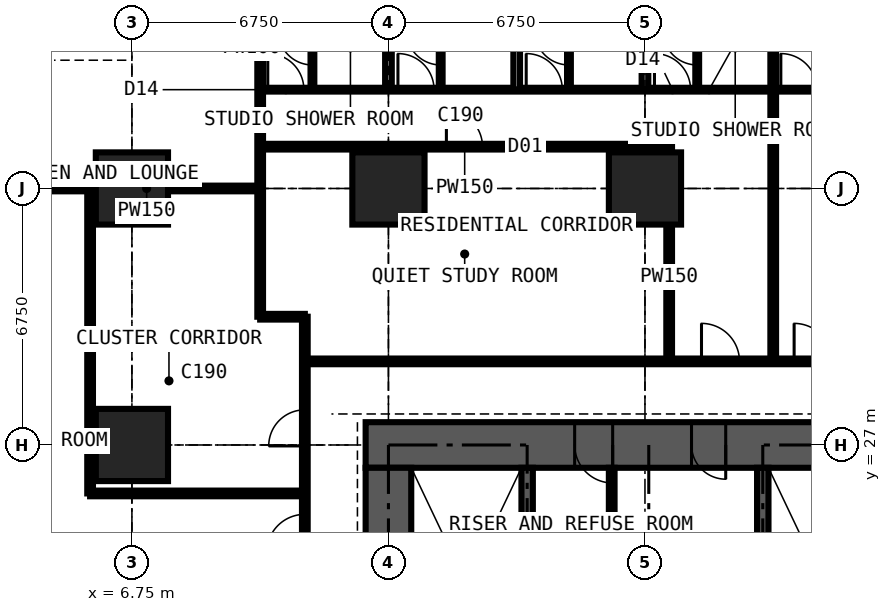
"""IFC4 building model, lengths in metres.
Left out: names, types, materials, properties, quantities, classifications, styles, units other than length and angle.
Written with IfcOpenShell. Run it as: python <this file> out.ifc"""

import sys

from ifc_helpers import new_model, si_unit, direction, frame, frame_2d, origin, origin_2d, place, context, subcontext, project, spatial, rectangle, extrude, element, fill, save


model = new_model("IFC4")
c1 = context("Model", 3, precision=1e-05, world=origin(), true_north=direction((0.0, 1.0)))
c2 = subcontext(c1, "Body", "Model", "MODEL_VIEW")
j1 = project(units=[si_unit("LENGTHUNIT", "METRE"), si_unit("PLANEANGLEUNIT", "RADIAN")], contexts=[c1])
p1 = place(None, origin())
s1 = spatial("IfcSite", under=j1, at=p1, CompositionType="ELEMENT")
p2 = place(p1, origin())
s2 = spatial("IfcBuilding", under=s1, at=p2, CompositionType="ELEMENT")
p3 = place(p2, frame((0.0, 0.0, 32.4)))
s3 = spatial("IfcBuildingStorey", under=s2, at=p3, CompositionType="ELEMENT", Elevation=32.4)
for number, where, z_axis, x_axis in (
    (1, (6.75, 27.0, 0.0), (0.0, 0.0, 1.0), (1.0, 0.0, 0.0)),
    (2, (6.75, 33.75, 0.0), (0.0, 0.0, 1.0), (1.0, 0.0, 0.0)),
    (3, (13.5, 33.75, 0.0), (0.0, 0.0, 1.0), (1.0, 0.0, 0.0)),
    (4, (20.25, 33.75, 0.0), (0.0, 0.0, 1.0), (1.0, 0.0, 0.0)),
):
    element("IfcColumn", number, at=place(p3, frame(where, z_axis=z_axis, x_axis=x_axis)), inside=s3, PredefinedType="COLUMN", context=c2, shape_type="SweptSolid", body=[
        extrude(rectangle(XDim=1.9, YDim=1.9, at=origin_2d()), origin(), (0.0, 0.0, 1.0), 3.6),
    ])
p4 = place(p3, frame((27.6, 27.0, 0.0), z_axis=(0.0, 0.0, 1.0), x_axis=(-1.0, 0.0, 0.0)))
e5 = element("IfcWall", 5, at=p4, inside=s3, PredefinedType="SHEAR", context=c2, shape_type="SweptSolid", body=[
    extrude(rectangle(XDim=14.7, YDim=1.2, at=frame_2d((7.35, 0.0))), origin(), (0.0, 0.0, 1.0), 3.6),
])
p5 = place(p4, frame((5.225, 0.0, 0.0)))
e6 = element("IfcOpeningElement", 6, at=p5, cuts=e5, PredefinedType="OPENING", context=c2, shape_type="SweptSolid", body=[
    extrude(rectangle(XDim=0.9, YDim=2.2, at=frame_2d((0.45, 1.1))), frame((0.0, 0.61, 0.0), z_axis=(0.0, -1.0, 0.0), x_axis=(1.0, 0.0, 0.0)), (0.0, 0.0, 1.0), 1.22),
])
p6 = place(p4, frame((8.2, 0.0, 0.0)))
e7 = element("IfcOpeningElement", 7, at=p6, cuts=e5, PredefinedType="OPENING", context=c2, shape_type="SweptSolid", body=[
    extrude(rectangle(XDim=1.0, YDim=2.2, at=frame_2d((0.5, 1.1))), frame((0.0, 0.61, 0.0), z_axis=(0.0, -1.0, 0.0), x_axis=(1.0, 0.0, 0.0)), (0.0, 0.0, 1.0), 1.22),
])
p7 = place(p3, frame((13.5, 26.4, 0.0), z_axis=(0.0, 0.0, 1.0), x_axis=(0.0, -1.0, 0.0)))
e8 = element("IfcWall", 8, at=p7, inside=s3, PredefinedType="SHEAR", context=c2, shape_type="SweptSolid", body=[
    extrude(rectangle(XDim=12.3, YDim=1.2, at=frame_2d((6.15, 0.0))), origin(), (0.0, 0.0, 1.0), 3.6),
])
p8 = place(p7, frame((7.45, 0.0, 0.0)))
e9 = element("IfcOpeningElement", 9, at=p8, cuts=e8, PredefinedType="OPENING", context=c2, shape_type="SweptSolid", body=[
    extrude(rectangle(XDim=1.2, YDim=2.2, at=frame_2d((0.6, 1.1))), frame((0.0, 0.61, 0.0), z_axis=(0.0, -1.0, 0.0), x_axis=(1.0, 0.0, 0.0)), (0.0, 0.0, 1.0), 1.22),
])
for number, where, z_axis, x_axis in (
    (10, (17.15, 20.3, 0.0), (0.0, 0.0, 1.0), (0.0, 1.0, 0.0)),
    (11, (23.35, 20.3, 0.0), (0.0, 0.0, 1.0), (0.0, 1.0, 0.0)),
):
    element("IfcWall", number, at=place(p3, frame(where, z_axis=z_axis, x_axis=x_axis)), inside=s3, PredefinedType="SHEAR", context=c2, shape_type="SweptSolid", body=[
        extrude(rectangle(XDim=6.1, YDim=0.3, at=frame_2d((3.05, 0.0))), origin(), (0.0, 0.0, 1.0), 3.6),
    ])
p9 = place(p3, frame((19.375, 23.4, 0.0), z_axis=(0.0, 0.0, 1.0), x_axis=(0.0, 1.0, 0.0)))
e12 = element("IfcWall", 12, at=p9, inside=s3, PredefinedType="PARTITIONING", context=c2, shape_type="SweptSolid", body=[
    extrude(rectangle(XDim=3.0, YDim=0.15, at=frame_2d((1.5, 0.0))), origin(), (0.0, 0.0, 1.0), 3.375),
])
p10 = place(p3, frame((4.15, 33.75, 0.0), z_axis=(0.0, 0.0, 1.0), x_axis=(1.0, 0.0, 0.0)))
e13 = element("IfcWall", 13, at=p10, inside=s3, PredefinedType="PARTITIONING", context=c2, shape_type="SweptSolid", body=[
    extrude(rectangle(XDim=5.975, YDim=0.15, at=frame_2d((2.988, 0.0))), origin(), (0.0, 0.0, 1.0), 2.877),
])
p11 = place(p3, frame((5.65, 25.725, 0.0), z_axis=(0.0, 0.0, 1.0), x_axis=(0.0, 1.0, 0.0)))
e14 = element("IfcWall", 14, at=p11, inside=s3, PredefinedType="PARTITIONING", context=c2, shape_type="SweptSolid", body=[
    extrude(rectangle(XDim=8.025, YDim=0.15, at=frame_2d((4.012, 0.0))), origin(), (0.0, 0.0, 1.0), 3.375),
])
p12 = place(p3, frame((5.65, 25.725, 0.0), z_axis=(0.0, 0.0, 1.0), x_axis=(1.0, 0.0, 0.0)))
e15 = element("IfcWall", 15, at=p12, inside=s3, PredefinedType="PARTITIONING", context=c2, shape_type="SweptSolid", body=[
    extrude(rectangle(XDim=5.65, YDim=0.15, at=frame_2d((2.825, 0.0))), origin(), (0.0, 0.0, 1.0), 3.375),
])
p13 = place(p3, frame((10.125, 30.375, 0.0), z_axis=(0.0, 0.0, 1.0), x_axis=(0.0, 1.0, 0.0)))
e16 = element("IfcWall", 16, at=p13, inside=s3, PredefinedType="PARTITIONING", context=c2, shape_type="SweptSolid", body=[
    extrude(rectangle(XDim=10.859, YDim=0.15, at=frame_2d((5.429, 0.0))), origin(), (0.0, 0.0, 1.0), 3.375),
])
p14 = place(p3, frame((10.125, 30.375, 0.0), z_axis=(0.0, 0.0, 1.0), x_axis=(1.0, 0.0, 0.0)))
e17 = element("IfcWall", 17, at=p14, inside=s3, PredefinedType="PARTITIONING", context=c2, shape_type="SweptSolid", body=[
    extrude(rectangle(XDim=1.175, YDim=0.15, at=frame_2d((0.587, 0.0))), origin(), (0.0, 0.0, 1.0), 3.375),
])
p15 = place(p3, frame((10.125, 34.85, 0.0), z_axis=(0.0, 0.0, 1.0), x_axis=(1.0, 0.0, 0.0)))
e18 = element("IfcWall", 18, at=p15, inside=s3, PredefinedType="PARTITIONING", context=c2, shape_type="SweptSolid", body=[
    extrude(rectangle(XDim=10.762, YDim=0.15, at=frame_2d((5.381, 0.0))), origin(), (0.0, 0.0, 1.0), 3.375),
])
p16 = place(p15, frame((4.9, 0.0, 0.0)))
e19 = element("IfcOpeningElement", 19, at=p16, cuts=e18, PredefinedType="OPENING", context=c2, shape_type="SweptSolid", body=[
    extrude(rectangle(XDim=0.95, YDim=2.2, at=frame_2d((0.475, 1.1))), frame((0.0, 0.085, 0.0), z_axis=(0.0, -1.0, 0.0), x_axis=(1.0, 0.0, 0.0)), (0.0, 0.0, 1.0), 0.17),
])
p17 = place(p3, frame((10.125, 36.35, 0.0), z_axis=(0.0, 0.0, 1.0), x_axis=(1.0, 0.0, 0.0)))
e20 = element("IfcWall", 20, at=p17, inside=s3, PredefinedType="PARTITIONING", context=c2, shape_type="SweptSolid", body=[
    extrude(rectangle(XDim=23.625, YDim=0.1, at=frame_2d((11.812, 0.0))), origin(), (0.0, 0.0, 1.0), 3.375),
])
p18 = place(p17, frame((20.5, 0.0, 0.0)))
e21 = element("IfcOpeningElement", 21, at=p18, cuts=e20, PredefinedType="OPENING", context=c2, shape_type="SweptSolid", body=[
    extrude(rectangle(XDim=0.95, YDim=2.2, at=frame_2d((0.475, 1.1))), frame((0.0, 0.06, 0.0), z_axis=(0.0, -1.0, 0.0), x_axis=(1.0, 0.0, 0.0)), (0.0, 0.0, 1.0), 0.12),
])
p19 = place(p17, frame((17.125, 0.0, 0.0)))
e22 = element("IfcOpeningElement", 22, at=p19, cuts=e20, PredefinedType="OPENING", context=c2, shape_type="SweptSolid", body=[
    extrude(rectangle(XDim=0.95, YDim=2.2, at=frame_2d((0.475, 1.1))), frame((0.0, 0.06, 0.0), z_axis=(0.0, -1.0, 0.0), x_axis=(1.0, 0.0, 0.0)), (0.0, 0.0, 1.0), 0.12),
])
p20 = place(p17, frame((13.7, 0.0, 0.0)))
e23 = element("IfcOpeningElement", 23, at=p20, cuts=e20, PredefinedType="OPENING", context=c2, shape_type="SweptSolid", body=[
    extrude(rectangle(XDim=0.95, YDim=2.2, at=frame_2d((0.475, 1.1))), frame((0.0, 0.06, 0.0), z_axis=(0.0, -1.0, 0.0), x_axis=(1.0, 0.0, 0.0)), (0.0, 0.0, 1.0), 0.12),
])
p21 = place(p17, frame((0.2, 0.0, 0.0)))
e24 = element("IfcOpeningElement", 24, at=p21, cuts=e20, PredefinedType="OPENING", context=c2, shape_type="SweptSolid", body=[
    extrude(rectangle(XDim=0.95, YDim=2.2, at=frame_2d((0.475, 1.1))), frame((0.0, 0.06, 0.0), z_axis=(0.0, -1.0, 0.0), x_axis=(1.0, 0.0, 0.0)), (0.0, 0.0, 1.0), 0.12),
])
p22 = place(p17, frame((3.625, 0.0, 0.0)))
e25 = element("IfcOpeningElement", 25, at=p22, cuts=e20, PredefinedType="OPENING", context=c2, shape_type="SweptSolid", body=[
    extrude(rectangle(XDim=0.95, YDim=2.2, at=frame_2d((0.475, 1.1))), frame((0.0, 0.06, 0.0), z_axis=(0.0, -1.0, 0.0), x_axis=(1.0, 0.0, 0.0)), (0.0, 0.0, 1.0), 0.12),
])
p23 = place(p17, frame((7.0, 0.0, 0.0)))
e26 = element("IfcOpeningElement", 26, at=p23, cuts=e20, PredefinedType="OPENING", context=c2, shape_type="SweptSolid", body=[
    extrude(rectangle(XDim=0.95, YDim=2.2, at=frame_2d((0.475, 1.1))), frame((0.0, 0.06, 0.0), z_axis=(0.0, -1.0, 0.0), x_axis=(1.0, 0.0, 0.0)), (0.0, 0.0, 1.0), 0.12),
])
p24 = place(p17, frame((10.375, 0.0, 0.0)))
e27 = element("IfcOpeningElement", 27, at=p24, cuts=e20, PredefinedType="OPENING", context=c2, shape_type="SweptSolid", body=[
    extrude(rectangle(XDim=0.95, YDim=2.2, at=frame_2d((0.475, 1.1))), frame((0.0, 0.06, 0.0), z_axis=(0.0, -1.0, 0.0), x_axis=(1.0, 0.0, 0.0)), (0.0, 0.0, 1.0), 0.12),
])
p25 = place(p3, frame((11.3, 11.3, 0.0), z_axis=(0.0, 0.0, 1.0), x_axis=(0.0, 1.0, 0.0)))
e28 = element("IfcWall", 28, at=p25, inside=s3, PredefinedType="PARTITIONING", context=c2, shape_type="SweptSolid", body=[
    extrude(rectangle(XDim=19.075, YDim=0.15, at=frame_2d((9.538, 0.0))), origin(), (0.0, 0.0, 1.0), 3.375),
])
p26 = place(p25, frame((12.875, 0.0, 0.0)))
e29 = element("IfcOpeningElement", 29, at=p26, cuts=e28, PredefinedType="OPENING", context=c2, shape_type="SweptSolid", body=[
    extrude(rectangle(XDim=1.0, YDim=2.2, at=frame_2d((0.5, 1.1))), frame((0.0, 0.085, 0.0), z_axis=(0.0, -1.0, 0.0), x_axis=(1.0, 0.0, 0.0)), (0.0, 0.0, 1.0), 0.17),
])
p27 = place(p25, frame((10.438, 0.0, 0.0)))
e30 = element("IfcOpeningElement", 30, at=p27, cuts=e28, PredefinedType="OPENING", context=c2, shape_type="SweptSolid", body=[
    extrude(rectangle(XDim=1.0, YDim=2.2, at=frame_2d((0.5, 1.1))), frame((0.0, 0.085, 0.0), z_axis=(0.0, -1.0, 0.0), x_axis=(1.0, 0.0, 0.0)), (0.0, 0.0, 1.0), 0.17),
])
p28 = place(p25, frame((15.675, 0.0, 0.0)))
e31 = element("IfcOpeningElement", 31, at=p28, cuts=e28, PredefinedType="OPENING", context=c2, shape_type="SweptSolid", body=[
    extrude(rectangle(XDim=0.95, YDim=2.2, at=frame_2d((0.475, 1.1))), frame((0.0, 0.085, 0.0), z_axis=(0.0, -1.0, 0.0), x_axis=(1.0, 0.0, 0.0)), (0.0, 0.0, 1.0), 0.17),
])
p29 = place(p3, frame((11.3, 29.2, 0.0), z_axis=(0.0, 0.0, 1.0), x_axis=(1.0, 0.0, 0.0)))
e32 = element("IfcWall", 32, at=p29, inside=s3, PredefinedType="PARTITIONING", context=c2, shape_type="SweptSolid", body=[
    extrude(rectangle(XDim=19.075, YDim=0.15, at=frame_2d((9.538, 0.0))), origin(), (0.0, 0.0, 1.0), 3.375),
])
p30 = place(p29, frame((12.875, 0.0, 0.0)))
e33 = element("IfcOpeningElement", 33, at=p30, cuts=e32, PredefinedType="OPENING", context=c2, shape_type="SweptSolid", body=[
    extrude(rectangle(XDim=1.0, YDim=2.2, at=frame_2d((0.5, 1.1))), frame((0.0, 0.085, 0.0), z_axis=(0.0, -1.0, 0.0), x_axis=(1.0, 0.0, 0.0)), (0.0, 0.0, 1.0), 0.17),
])
p31 = place(p29, frame((10.438, 0.0, 0.0)))
e34 = element("IfcOpeningElement", 34, at=p31, cuts=e32, PredefinedType="OPENING", context=c2, shape_type="SweptSolid", body=[
    extrude(rectangle(XDim=1.0, YDim=2.2, at=frame_2d((0.5, 1.1))), frame((0.0, 0.085, 0.0), z_axis=(0.0, -1.0, 0.0), x_axis=(1.0, 0.0, 0.0)), (0.0, 0.0, 1.0), 0.17),
])
p32 = place(p29, frame((15.675, 0.0, 0.0)))
e35 = element("IfcOpeningElement", 35, at=p32, cuts=e32, PredefinedType="OPENING", context=c2, shape_type="SweptSolid", body=[
    extrude(rectangle(XDim=0.95, YDim=2.2, at=frame_2d((0.475, 1.1))), frame((0.0, 0.085, 0.0), z_axis=(0.0, -1.0, 0.0), x_axis=(1.0, 0.0, 0.0)), (0.0, 0.0, 1.0), 0.17),
])
p33 = place(p3, frame((11.5, 36.35, 0.0), z_axis=(0.0, 0.0, 1.0), x_axis=(0.0, 1.0, 0.0)))
e36 = element("IfcWall", 36, at=p33, inside=s3, PredefinedType="PARTITIONING", context=c2, shape_type="SweptSolid", body=[
    extrude(rectangle(XDim=2.2, YDim=0.1, at=frame_2d((1.1, 0.0))), origin(), (0.0, 0.0, 1.0), 3.375),
])
p34 = place(p33, frame((0.65, 0.0, 0.0)))
e37 = element("IfcOpeningElement", 37, at=p34, cuts=e36, PredefinedType="OPENING", context=c2, shape_type="SweptSolid", body=[
    extrude(rectangle(XDim=0.9, YDim=2.2, at=frame_2d((0.45, 1.1))), frame((0.0, 0.06, 0.0), z_axis=(0.0, -1.0, 0.0), x_axis=(1.0, 0.0, 0.0)), (0.0, 0.0, 1.0), 0.12),
])
p35 = place(p3, frame((13.5, 36.35, 0.0), z_axis=(0.0, 0.0, 1.0), x_axis=(0.0, 1.0, 0.0)))
e38 = element("IfcWall", 38, at=p35, inside=s3, PredefinedType="PARTITIONING", context=c2, shape_type="SweptSolid", body=[
    extrude(rectangle(XDim=4.884, YDim=0.175, at=frame_2d((2.442, 0.0))), origin(), (0.0, 0.0, 1.0), 2.877),
])
p36 = place(p3, frame((14.875, 36.35, 0.0), z_axis=(0.0, 0.0, 1.0), x_axis=(0.0, 1.0, 0.0)))
e39 = element("IfcWall", 39, at=p36, inside=s3, PredefinedType="PARTITIONING", context=c2, shape_type="SweptSolid", body=[
    extrude(rectangle(XDim=2.2, YDim=0.1, at=frame_2d((1.1, 0.0))), origin(), (0.0, 0.0, 1.0), 3.375),
])
p37 = place(p36, frame((0.65, 0.0, 0.0)))
e40 = element("IfcOpeningElement", 40, at=p37, cuts=e39, PredefinedType="OPENING", context=c2, shape_type="SweptSolid", body=[
    extrude(rectangle(XDim=0.9, YDim=2.2, at=frame_2d((0.45, 1.1))), frame((0.0, 0.06, 0.0), z_axis=(0.0, -1.0, 0.0), x_axis=(1.0, 0.0, 0.0)), (0.0, 0.0, 1.0), 0.12),
])
p38 = place(p3, frame((16.875, 36.35, 0.0), z_axis=(0.0, 0.0, 1.0), x_axis=(0.0, 1.0, 0.0)))
e41 = element("IfcWall", 41, at=p38, inside=s3, PredefinedType="PARTITIONING", context=c2, shape_type="SweptSolid", body=[
    extrude(rectangle(XDim=4.884, YDim=0.175, at=frame_2d((2.442, 0.0))), origin(), (0.0, 0.0, 1.0), 3.375),
])
p39 = place(p3, frame((18.25, 36.35, 0.0), z_axis=(0.0, 0.0, 1.0), x_axis=(0.0, 1.0, 0.0)))
e42 = element("IfcWall", 42, at=p39, inside=s3, PredefinedType="PARTITIONING", context=c2, shape_type="SweptSolid", body=[
    extrude(rectangle(XDim=2.2, YDim=0.1, at=frame_2d((1.1, 0.0))), origin(), (0.0, 0.0, 1.0), 3.375),
])
p40 = place(p39, frame((0.65, 0.0, 0.0)))
e43 = element("IfcOpeningElement", 43, at=p40, cuts=e42, PredefinedType="OPENING", context=c2, shape_type="SweptSolid", body=[
    extrude(rectangle(XDim=0.9, YDim=2.2, at=frame_2d((0.45, 1.1))), frame((0.0, 0.06, 0.0), z_axis=(0.0, -1.0, 0.0), x_axis=(1.0, 0.0, 0.0)), (0.0, 0.0, 1.0), 0.12),
])
p41 = place(p3, frame((20.25, 36.35, 0.0), z_axis=(0.0, 0.0, 1.0), x_axis=(0.0, 1.0, 0.0)))
e44 = element("IfcWall", 44, at=p41, inside=s3, PredefinedType="PARTITIONING", context=c2, shape_type="SweptSolid", body=[
    extrude(rectangle(XDim=4.884, YDim=0.175, at=frame_2d((2.442, 0.0))), origin(), (0.0, 0.0, 1.0), 2.61),
])
p42 = place(p3, frame((20.887, 29.2, 0.0), z_axis=(0.0, 0.0, 1.0), x_axis=(0.0, 1.0, 0.0)))
e45 = element("IfcWall", 45, at=p42, inside=s3, PredefinedType="PARTITIONING", context=c2, shape_type="SweptSolid", body=[
    extrude(rectangle(XDim=5.65, YDim=0.15, at=frame_2d((2.825, 0.0))), origin(), (0.0, 0.0, 1.0), 3.375),
])
p43 = place(p3, frame((21.625, 36.35, 0.0), z_axis=(0.0, 0.0, 1.0), x_axis=(0.0, 1.0, 0.0)))
e46 = element("IfcWall", 46, at=p43, inside=s3, PredefinedType="PARTITIONING", context=c2, shape_type="SweptSolid", body=[
    extrude(rectangle(XDim=2.2, YDim=0.1, at=frame_2d((1.1, 0.0))), origin(), (0.0, 0.0, 1.0), 3.375),
])
p44 = place(p43, frame((0.65, 0.0, 0.0)))
e47 = element("IfcOpeningElement", 47, at=p44, cuts=e46, PredefinedType="OPENING", context=c2, shape_type="SweptSolid", body=[
    extrude(rectangle(XDim=0.9, YDim=2.2, at=frame_2d((0.45, 1.1))), frame((0.0, 0.06, 0.0), z_axis=(0.0, -1.0, 0.0), x_axis=(1.0, 0.0, 0.0)), (0.0, 0.0, 1.0), 0.12),
])
p45 = place(p3, frame((23.625, 29.2, 0.0), z_axis=(0.0, 0.0, 1.0), x_axis=(0.0, 1.0, 0.0)))
e48 = element("IfcWall", 48, at=p45, inside=s3, PredefinedType="PARTITIONING", context=c2, shape_type="SweptSolid", body=[
    extrude(rectangle(XDim=12.034, YDim=0.15, at=frame_2d((6.017, 0.0))), origin(), (0.0, 0.0, 1.0), 3.375),
])
p46 = place(p5, origin())
e49 = element("IfcDoor", 49, at=p46, inside=s3, OperationType="SINGLE_SWING_LEFT", PredefinedType="DOOR", context=c2, shape_type="SweptSolid", body=[
    extrude(rectangle(XDim=0.9, YDim=2.2, at=frame_2d((0.45, 1.1))), frame((0.0, 0.4, 0.0), z_axis=(0.0, -1.0, 0.0), x_axis=(1.0, 0.0, 0.0)), (0.0, 0.0, 1.0), 0.8),
])
fill(e6, e49)
p47 = place(p6, origin())
e50 = element("IfcDoor", 50, at=p47, inside=s3, OperationType="SINGLE_SWING_LEFT", PredefinedType="DOOR", context=c2, shape_type="SweptSolid", body=[
    extrude(rectangle(XDim=1.0, YDim=2.2, at=frame_2d((0.5, 1.1))), frame((0.0, 0.025, 0.0), z_axis=(0.0, -1.0, 0.0), x_axis=(1.0, 0.0, 0.0)), (0.0, 0.0, 1.0), 0.05),
])
fill(e7, e50)
p48 = place(p20, origin())
e51 = element("IfcDoor", 51, at=p48, inside=s3, OperationType="SINGLE_SWING_LEFT", PredefinedType="DOOR", context=c2, shape_type="SweptSolid", body=[
    extrude(rectangle(XDim=0.95, YDim=2.2, at=frame_2d((0.475, 1.1))), frame((0.0, 0.025, 0.0), z_axis=(0.0, -1.0, 0.0), x_axis=(1.0, 0.0, 0.0)), (0.0, 0.0, 1.0), 0.05),
])
fill(e23, e51)
p49 = place(p30, origin())
e52 = element("IfcDoor", 52, at=p49, inside=s3, OperationType="SINGLE_SWING_LEFT", PredefinedType="DOOR", context=c2, shape_type="SweptSolid", body=[
    extrude(rectangle(XDim=1.0, YDim=2.2, at=frame_2d((0.5, 1.1))), frame((0.0, 0.025, 0.0), z_axis=(0.0, -1.0, 0.0), x_axis=(1.0, 0.0, 0.0)), (0.0, 0.0, 1.0), 0.05),
])
fill(e33, e52)
p50 = place(p21, origin())
e53 = element("IfcDoor", 53, at=p50, inside=s3, OperationType="SINGLE_SWING_LEFT", PredefinedType="DOOR", context=c2, shape_type="SweptSolid", body=[
    extrude(rectangle(XDim=0.95, YDim=2.2, at=frame_2d((0.475, 1.1))), frame((0.0, 0.025, 0.0), z_axis=(0.0, -1.0, 0.0), x_axis=(1.0, 0.0, 0.0)), (0.0, 0.0, 1.0), 0.05),
])
fill(e24, e53)
p51 = place(p34, origin())
e54 = element("IfcDoor", 54, at=p51, inside=s3, OperationType="SINGLE_SWING_RIGHT", PredefinedType="DOOR", context=c2, shape_type="SweptSolid", body=[
    extrude(rectangle(XDim=0.9, YDim=2.2, at=frame_2d((0.45, 1.1))), frame((0.0, 0.025, 0.0), z_axis=(0.0, -1.0, 0.0), x_axis=(1.0, 0.0, 0.0)), (0.0, 0.0, 1.0), 0.05),
])
fill(e37, e54)
p52 = place(p22, origin())
e55 = element("IfcDoor", 55, at=p52, inside=s3, OperationType="SINGLE_SWING_LEFT", PredefinedType="DOOR", context=c2, shape_type="SweptSolid", body=[
    extrude(rectangle(XDim=0.95, YDim=2.2, at=frame_2d((0.475, 1.1))), frame((0.0, 0.025, 0.0), z_axis=(0.0, -1.0, 0.0), x_axis=(1.0, 0.0, 0.0)), (0.0, 0.0, 1.0), 0.05),
])
fill(e25, e55)
p53 = place(p37, origin())
e56 = element("IfcDoor", 56, at=p53, inside=s3, OperationType="SINGLE_SWING_RIGHT", PredefinedType="DOOR", context=c2, shape_type="SweptSolid", body=[
    extrude(rectangle(XDim=0.9, YDim=2.2, at=frame_2d((0.45, 1.1))), frame((0.0, 0.025, 0.0), z_axis=(0.0, -1.0, 0.0), x_axis=(1.0, 0.0, 0.0)), (0.0, 0.0, 1.0), 0.05),
])
fill(e40, e56)
p54 = place(p23, origin())
e57 = element("IfcDoor", 57, at=p54, inside=s3, OperationType="SINGLE_SWING_LEFT", PredefinedType="DOOR", context=c2, shape_type="SweptSolid", body=[
    extrude(rectangle(XDim=0.95, YDim=2.2, at=frame_2d((0.475, 1.1))), frame((0.0, 0.025, 0.0), z_axis=(0.0, -1.0, 0.0), x_axis=(1.0, 0.0, 0.0)), (0.0, 0.0, 1.0), 0.05),
])
fill(e26, e57)
p55 = place(p40, origin())
e58 = element("IfcDoor", 58, at=p55, inside=s3, OperationType="SINGLE_SWING_RIGHT", PredefinedType="DOOR", context=c2, shape_type="SweptSolid", body=[
    extrude(rectangle(XDim=0.9, YDim=2.2, at=frame_2d((0.45, 1.1))), frame((0.0, 0.025, 0.0), z_axis=(0.0, -1.0, 0.0), x_axis=(1.0, 0.0, 0.0)), (0.0, 0.0, 1.0), 0.05),
])
fill(e43, e58)
p56 = place(p24, origin())
e59 = element("IfcDoor", 59, at=p56, inside=s3, OperationType="SINGLE_SWING_LEFT", PredefinedType="DOOR", context=c2, shape_type="SweptSolid", body=[
    extrude(rectangle(XDim=0.95, YDim=2.2, at=frame_2d((0.475, 1.1))), frame((0.0, 0.025, 0.0), z_axis=(0.0, -1.0, 0.0), x_axis=(1.0, 0.0, 0.0)), (0.0, 0.0, 1.0), 0.05),
])
fill(e27, e59)
p57 = place(p44, origin())
e60 = element("IfcDoor", 60, at=p57, inside=s3, OperationType="SINGLE_SWING_RIGHT", PredefinedType="DOOR", context=c2, shape_type="SweptSolid", body=[
    extrude(rectangle(XDim=0.9, YDim=2.2, at=frame_2d((0.45, 1.1))), frame((0.0, 0.025, 0.0), z_axis=(0.0, -1.0, 0.0), x_axis=(1.0, 0.0, 0.0)), (0.0, 0.0, 1.0), 0.05),
])
fill(e47, e60)
p58 = place(p31, origin())
e61 = element("IfcDoor", 61, at=p58, inside=s3, OperationType="SINGLE_SWING_LEFT", PredefinedType="DOOR", context=c2, shape_type="SweptSolid", body=[
    extrude(rectangle(XDim=1.0, YDim=2.2, at=frame_2d((0.5, 1.1))), frame((0.0, 0.025, 0.0), z_axis=(0.0, -1.0, 0.0), x_axis=(1.0, 0.0, 0.0)), (0.0, 0.0, 1.0), 0.05),
])
fill(e34, e61)
p59 = place(p16, origin())
e62 = element("IfcDoor", 62, at=p59, inside=s3, OperationType="SINGLE_SWING_LEFT", PredefinedType="DOOR", context=c2, shape_type="SweptSolid", body=[
    extrude(rectangle(XDim=0.95, YDim=2.2, at=frame_2d((0.475, 1.1))), frame((0.0, 0.025, 0.0), z_axis=(0.0, -1.0, 0.0), x_axis=(1.0, 0.0, 0.0)), (0.0, 0.0, 1.0), 0.05),
])
fill(e19, e62)
p60 = place(p26, origin())
e63 = element("IfcDoor", 63, at=p60, inside=s3, OperationType="SINGLE_SWING_LEFT", PredefinedType="DOOR", context=c2, shape_type="SweptSolid", body=[
    extrude(rectangle(XDim=1.0, YDim=2.2, at=frame_2d((0.5, 1.1))), frame((0.0, 0.025, 0.0), z_axis=(0.0, -1.0, 0.0), x_axis=(1.0, 0.0, 0.0)), (0.0, 0.0, 1.0), 0.05),
])
fill(e29, e63)
p61 = place(p28, origin())
e64 = element("IfcDoor", 64, at=p61, inside=s3, OperationType="SINGLE_SWING_LEFT", PredefinedType="DOOR", context=c2, shape_type="SweptSolid", body=[
    extrude(rectangle(XDim=0.95, YDim=2.2, at=frame_2d((0.475, 1.1))), frame((0.0, 0.025, 0.0), z_axis=(0.0, -1.0, 0.0), x_axis=(1.0, 0.0, 0.0)), (0.0, 0.0, 1.0), 0.05),
])
fill(e31, e64)
save(model, sys.argv[1])
